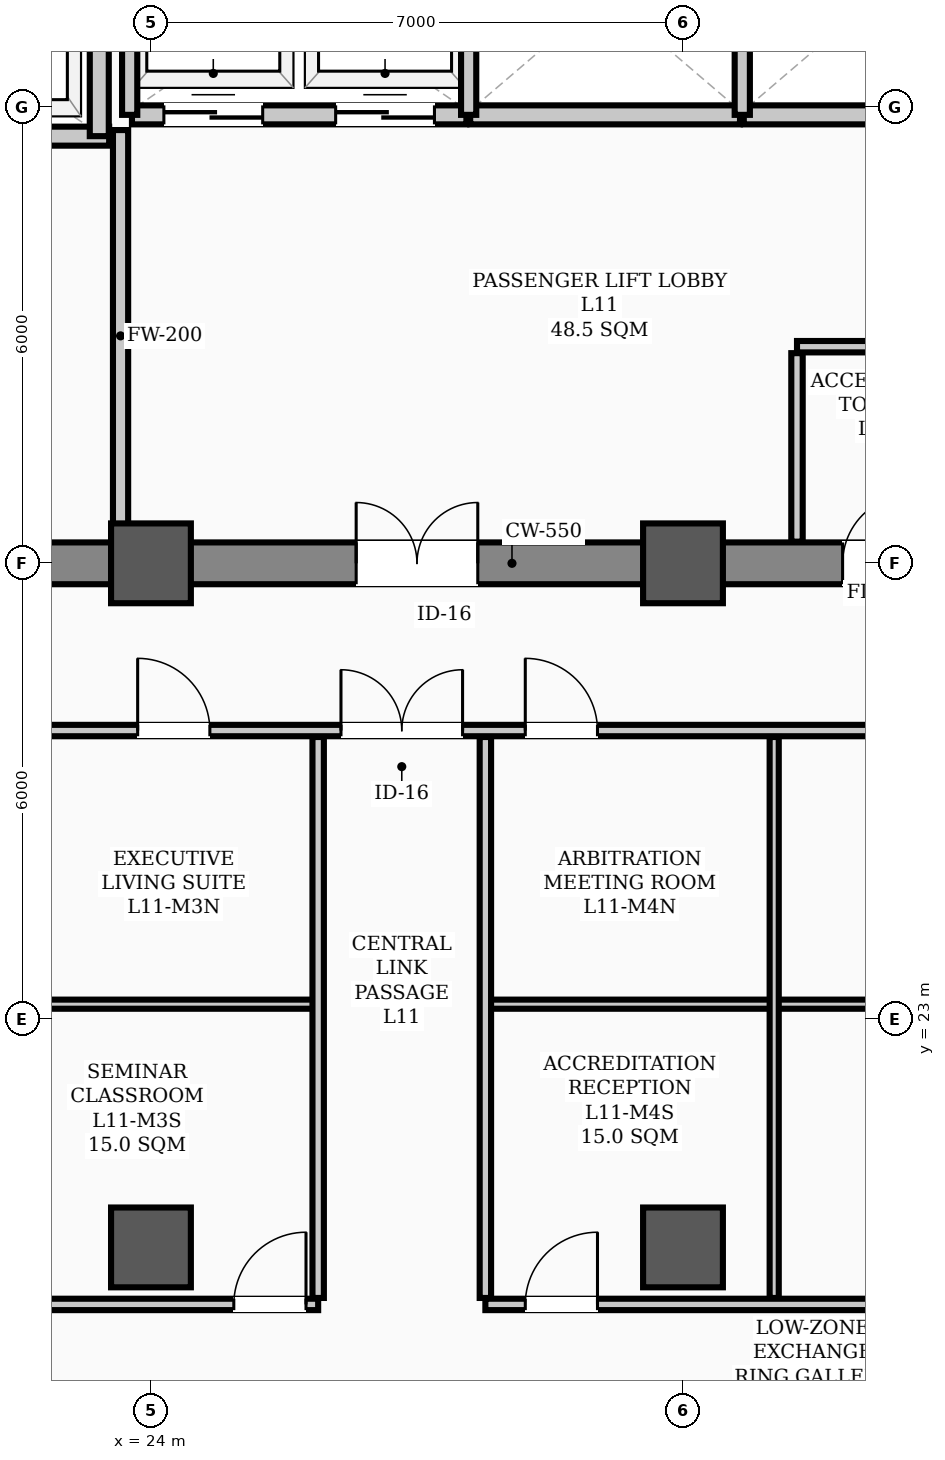
"""IFC4 building model, lengths in metres.
Left out: names, types, materials, properties, quantities, classifications, styles, units other than length and angle.
Written with IfcOpenShell. Run it as: python <this file> out.ifc"""

import sys

from ifc_helpers import new_model, si_unit, direction, frame, frame_2d, origin, origin_2d, place, context, subcontext, project, spatial, rectangle, hollow_rectangle, extrude, element, fill, save


model = new_model("IFC4")
c1 = context("Model", 3, precision=1e-05, world=origin(), true_north=direction((0.0, 1.0)))
c2 = subcontext(c1, "Body", "Model", "MODEL_VIEW")
j1 = project(units=[si_unit("LENGTHUNIT", "METRE"), si_unit("PLANEANGLEUNIT", "RADIAN")], contexts=[c1])
p1 = place(None, origin())
s1 = spatial("IfcSite", under=j1, at=p1, CompositionType="ELEMENT")
p2 = place(p1, origin())
s2 = spatial("IfcBuilding", under=s1, at=p2, CompositionType="ELEMENT")
p3 = place(p2, frame((0.0, 0.0, 46.0)))
s3 = spatial("IfcBuildingStorey", under=s2, at=p3, CompositionType="ELEMENT", Elevation=46.0)
for number, where, z_axis, x_axis in (
    (1, (24.0, 29.0, 0.0), (0.0, 0.0, 1.0), (1.0, 0.0, 0.0)),
    (2, (31.0, 29.0, 0.0), (0.0, 0.0, 1.0), (1.0, 0.0, 0.0)),
    (3, (24.0, 20.0, 0.0), (0.0, 0.0, 1.0), (1.0, 0.0, 0.0)),
    (4, (31.0, 20.0, 0.0), (0.0, 0.0, 1.0), (1.0, 0.0, 0.0)),
):
    element("IfcColumn", number, at=place(p3, frame(where, z_axis=z_axis, x_axis=x_axis)), inside=s3, PredefinedType="COLUMN", context=c2, shape_type="SweptSolid", body=[
        extrude(hollow_rectangle(XDim=1.05, YDim=1.05, WallThickness=0.038, InnerFilletRadius=0.019, OuterFilletRadius=0.057, at=origin_2d()), origin(), (0.0, 0.0, 1.0), 3.9),
    ])
p4 = place(p3, frame((13.5, 29.0, 0.0), z_axis=(0.0, 0.0, 1.0), x_axis=(1.0, 0.0, 0.0)))
e5 = element("IfcWall", 5, at=p4, inside=s3, PredefinedType="SHEAR", context=c2, shape_type="SweptSolid", body=[
    extrude(rectangle(XDim=30.5, YDim=0.55, at=frame_2d((15.25, 0.0))), origin(), (0.0, 0.0, 1.0), 3.72),
])
p5 = place(p4, frame((1.75, 0.0, 0.0)))
e6 = element("IfcOpeningElement", 6, at=p5, cuts=e5, PredefinedType="OPENING", context=c2, shape_type="SweptSolid", body=[
    extrude(rectangle(XDim=1.1, YDim=2.08, at=frame_2d((0.55, 1.04))), frame((0.0, 0.285, 0.0), z_axis=(0.0, -1.0, 0.0), x_axis=(1.0, 0.0, 0.0)), (0.0, 0.0, 1.0), 0.57),
])
p6 = place(p4, frame((26.7, 0.0, 0.0)))
e7 = element("IfcOpeningElement", 7, at=p6, cuts=e5, PredefinedType="OPENING", context=c2, shape_type="SweptSolid", body=[
    extrude(rectangle(XDim=1.1, YDim=2.08, at=frame_2d((0.55, 1.04))), frame((0.0, 0.285, 0.0), z_axis=(0.0, -1.0, 0.0), x_axis=(1.0, 0.0, 0.0)), (0.0, 0.0, 1.0), 0.57),
])
p7 = place(p4, frame((6.8, 0.0, 0.0)))
e8 = element("IfcOpeningElement", 8, at=p7, cuts=e5, PredefinedType="OPENING", context=c2, shape_type="SweptSolid", body=[
    extrude(rectangle(XDim=1.1, YDim=2.08, at=frame_2d((0.55, 1.04))), frame((0.0, 0.285, 0.0), z_axis=(0.0, -1.0, 0.0), x_axis=(1.0, 0.0, 0.0)), (0.0, 0.0, 1.0), 0.57),
])
p8 = place(p4, frame((13.2, 0.0, 0.0)))
e9 = element("IfcOpeningElement", 9, at=p8, cuts=e5, PredefinedType="OPENING", context=c2, shape_type="SweptSolid", body=[
    extrude(rectangle(XDim=1.6, YDim=2.08, at=frame_2d((0.8, 1.04))), frame((0.0, 0.285, 0.0), z_axis=(0.0, -1.0, 0.0), x_axis=(1.0, 0.0, 0.0)), (0.0, 0.0, 1.0), 0.57),
])
p9 = place(p4, frame((19.6, 0.0, 0.0)))
e10 = element("IfcOpeningElement", 10, at=p9, cuts=e5, PredefinedType="OPENING", context=c2, shape_type="SweptSolid", body=[
    extrude(rectangle(XDim=0.9, YDim=2.08, at=frame_2d((0.45, 1.04))), frame((0.0, 0.285, 0.0), z_axis=(0.0, -1.0, 0.0), x_axis=(1.0, 0.0, 0.0)), (0.0, 0.0, 1.0), 0.57),
])
p10 = place(p4, frame((21.6, 0.0, 0.0)))
e11 = element("IfcOpeningElement", 11, at=p10, cuts=e5, PredefinedType="OPENING", context=c2, shape_type="SweptSolid", body=[
    extrude(rectangle(XDim=0.9, YDim=2.08, at=frame_2d((0.45, 1.04))), frame((0.0, 0.285, 0.0), z_axis=(0.0, -1.0, 0.0), x_axis=(1.0, 0.0, 0.0)), (0.0, 0.0, 1.0), 0.57),
])
p11 = place(p3, frame((18.1, 34.62, 0.0), z_axis=(0.0, 0.0, 1.0), x_axis=(1.0, 0.0, 0.0)))
e12 = element("IfcWall", 12, at=p11, inside=s3, PredefinedType="STANDARD", context=c2, shape_type="SweptSolid", body=[
    extrude(rectangle(XDim=5.35, YDim=0.25, at=frame_2d((2.675, 0.0))), origin(), (0.0, 0.0, 1.0), 3.72),
])
p12 = place(p11, frame((0.85, 0.0, 0.0)))
e13 = element("IfcOpeningElement", 13, at=p12, cuts=e12, PredefinedType="OPENING", context=c2, shape_type="SweptSolid", body=[
    extrude(rectangle(XDim=1.1, YDim=2.08, at=frame_2d((0.55, 1.04))), frame((0.0, 0.135, 0.0), z_axis=(0.0, -1.0, 0.0), x_axis=(1.0, 0.0, 0.0)), (0.0, 0.0, 1.0), 0.27),
])
p13 = place(p11, frame((3.45, 0.0, 0.0)))
e14 = element("IfcOpeningElement", 14, at=p13, cuts=e12, PredefinedType="OPENING", context=c2, shape_type="SweptSolid", body=[
    extrude(rectangle(XDim=1.1, YDim=2.08, at=frame_2d((0.55, 1.04))), frame((0.0, 0.135, 0.0), z_axis=(0.0, -1.0, 0.0), x_axis=(1.0, 0.0, 0.0)), (0.0, 0.0, 1.0), 0.27),
])
p14 = place(p3, frame((23.32, 34.62, 0.0), z_axis=(0.0, 0.0, 1.0), x_axis=(0.0, 1.0, 0.0)))
e15 = element("IfcWall", 15, at=p14, inside=s3, PredefinedType="STANDARD", context=c2, shape_type="SweptSolid", body=[
    extrude(rectangle(XDim=3.33, YDim=0.25, at=frame_2d((1.665, 0.0))), origin(), (0.0, 0.0, 1.0), 3.3),
])
p15 = place(p3, frame((23.75, 34.9, 0.0), z_axis=(0.0, 0.0, 1.0), x_axis=(1.0, 0.0, 0.0)))
e16 = element("IfcWall", 16, at=p15, inside=s3, PredefinedType="STANDARD", context=c2, shape_type="SweptSolid", body=[
    extrude(rectangle(XDim=4.4, YDim=0.25, at=frame_2d((2.2, 0.0))), origin(), (0.0, 0.0, 1.0), 3.72),
])
p16 = place(p15, frame((0.42, 0.0, 0.0)))
e17 = element("IfcOpeningElement", 17, at=p16, cuts=e16, PredefinedType="OPENING", context=c2, shape_type="SweptSolid", body=[
    extrude(rectangle(XDim=1.3, YDim=2.08, at=frame_2d((0.65, 1.04))), frame((0.0, 0.135, 0.0), z_axis=(0.0, -1.0, 0.0), x_axis=(1.0, 0.0, 0.0)), (0.0, 0.0, 1.0), 0.27),
])
p17 = place(p15, frame((2.68, 0.0, 0.0)))
e18 = element("IfcOpeningElement", 18, at=p17, cuts=e16, PredefinedType="OPENING", context=c2, shape_type="SweptSolid", body=[
    extrude(rectangle(XDim=1.3, YDim=2.08, at=frame_2d((0.65, 1.04))), frame((0.0, 0.135, 0.0), z_axis=(0.0, -1.0, 0.0), x_axis=(1.0, 0.0, 0.0)), (0.0, 0.0, 1.0), 0.27),
])
p18 = place(p3, frame((28.2, 34.9, 0.0), z_axis=(0.0, 0.0, 1.0), x_axis=(1.0, 0.0, 0.0)))
e19 = element("IfcWall", 19, at=p18, inside=s3, PredefinedType="STANDARD", context=c2, shape_type="SweptSolid", body=[
    extrude(rectangle(XDim=3.55, YDim=0.25, at=frame_2d((1.775, 0.0))), origin(), (0.0, 0.0, 1.0), 3.72),
])
p19 = place(p3, frame((31.8, 34.9, 0.0), z_axis=(0.0, 0.0, 1.0), x_axis=(1.0, 0.0, 0.0)))
e20 = element("IfcWall", 20, at=p19, inside=s3, PredefinedType="STANDARD", context=c2, shape_type="SweptSolid", body=[
    extrude(rectangle(XDim=3.6, YDim=0.25, at=frame_2d((1.8, 0.0))), origin(), (0.0, 0.0, 1.0), 3.72),
])
p20 = place(p3, frame((32.5, 31.85, 0.0), z_axis=(0.0, 0.0, 1.0), x_axis=(1.0, 0.0, 0.0)))
e21 = element("IfcWall", 21, at=p20, inside=s3, PredefinedType="PARTITIONING", context=c2, shape_type="SweptSolid", body=[
    extrude(rectangle(XDim=4.1, YDim=0.15, at=frame_2d((2.05, 0.0))), origin(), (0.0, 0.0, 1.0), 3.72),
])
p21 = place(p3, frame((12.9, 26.8, 0.0), z_axis=(0.0, 0.0, 1.0), x_axis=(1.0, 0.0, 0.0)))
e22 = element("IfcWall", 22, at=p21, inside=s3, PredefinedType="PARTITIONING", context=c2, shape_type="SweptSolid", body=[
    extrude(rectangle(XDim=31.7, YDim=0.15, at=frame_2d((15.85, 0.0))), origin(), (0.0, 0.0, 1.0), 3.1),
])
p22 = place(p21, frame((13.6, 0.0, 0.0)))
e23 = element("IfcOpeningElement", 23, at=p22, cuts=e22, PredefinedType="OPENING", context=c2, shape_type="SweptSolid", body=[
    extrude(rectangle(XDim=1.6, YDim=2.08, at=frame_2d((0.8, 1.04))), frame((0.0, 0.085, 0.0), z_axis=(0.0, -1.0, 0.0), x_axis=(1.0, 0.0, 0.0)), (0.0, 0.0, 1.0), 0.17),
])
p23 = place(p21, frame((2.175, 0.0, 0.0)))
e24 = element("IfcOpeningElement", 24, at=p23, cuts=e22, PredefinedType="OPENING", context=c2, shape_type="SweptSolid", body=[
    extrude(rectangle(XDim=0.95, YDim=2.08, at=frame_2d((0.475, 1.04))), frame((0.0, 0.085, 0.0), z_axis=(0.0, -1.0, 0.0), x_axis=(1.0, 0.0, 0.0)), (0.0, 0.0, 1.0), 0.17),
])
p24 = place(p21, frame((6.925, 0.0, 0.0)))
e25 = element("IfcOpeningElement", 25, at=p24, cuts=e22, PredefinedType="OPENING", context=c2, shape_type="SweptSolid", body=[
    extrude(rectangle(XDim=0.95, YDim=2.08, at=frame_2d((0.475, 1.04))), frame((0.0, 0.085, 0.0), z_axis=(0.0, -1.0, 0.0), x_axis=(1.0, 0.0, 0.0)), (0.0, 0.0, 1.0), 0.17),
])
p25 = place(p21, frame((10.925, 0.0, 0.0)))
e26 = element("IfcOpeningElement", 26, at=p25, cuts=e22, PredefinedType="OPENING", context=c2, shape_type="SweptSolid", body=[
    extrude(rectangle(XDim=0.95, YDim=2.08, at=frame_2d((0.475, 1.04))), frame((0.0, 0.085, 0.0), z_axis=(0.0, -1.0, 0.0), x_axis=(1.0, 0.0, 0.0)), (0.0, 0.0, 1.0), 0.17),
])
p26 = place(p21, frame((16.025, 0.0, 0.0)))
e27 = element("IfcOpeningElement", 27, at=p26, cuts=e22, PredefinedType="OPENING", context=c2, shape_type="SweptSolid", body=[
    extrude(rectangle(XDim=0.95, YDim=2.08, at=frame_2d((0.475, 1.04))), frame((0.0, 0.085, 0.0), z_axis=(0.0, -1.0, 0.0), x_axis=(1.0, 0.0, 0.0)), (0.0, 0.0, 1.0), 0.17),
])
p27 = place(p21, frame((21.725, 0.0, 0.0)))
e28 = element("IfcOpeningElement", 28, at=p27, cuts=e22, PredefinedType="OPENING", context=c2, shape_type="SweptSolid", body=[
    extrude(rectangle(XDim=0.95, YDim=2.08, at=frame_2d((0.475, 1.04))), frame((0.0, 0.085, 0.0), z_axis=(0.0, -1.0, 0.0), x_axis=(1.0, 0.0, 0.0)), (0.0, 0.0, 1.0), 0.17),
])
p28 = place(p21, frame((27.925, 0.0, 0.0)))
e29 = element("IfcOpeningElement", 29, at=p28, cuts=e22, PredefinedType="OPENING", context=c2, shape_type="SweptSolid", body=[
    extrude(rectangle(XDim=0.95, YDim=2.08, at=frame_2d((0.475, 1.04))), frame((0.0, 0.085, 0.0), z_axis=(0.0, -1.0, 0.0), x_axis=(1.0, 0.0, 0.0)), (0.0, 0.0, 1.0), 0.17),
])
p29 = place(p3, frame((12.9, 19.25, 0.0), z_axis=(0.0, 0.0, 1.0), x_axis=(1.0, 0.0, 0.0)))
e30 = element("IfcWall", 30, at=p29, inside=s3, PredefinedType="PARTITIONING", context=c2, shape_type="SweptSolid", body=[
    extrude(rectangle(XDim=13.3, YDim=0.15, at=frame_2d((6.65, 0.0))), origin(), (0.0, 0.0, 1.0), 3.1),
])
p30 = place(p29, frame((2.175, 0.0, 0.0)))
e31 = element("IfcOpeningElement", 31, at=p30, cuts=e30, PredefinedType="OPENING", context=c2, shape_type="SweptSolid", body=[
    extrude(rectangle(XDim=0.95, YDim=2.08, at=frame_2d((0.475, 1.04))), frame((0.0, 0.085, 0.0), z_axis=(0.0, -1.0, 0.0), x_axis=(1.0, 0.0, 0.0)), (0.0, 0.0, 1.0), 0.17),
])
p31 = place(p29, frame((6.925, 0.0, 0.0)))
e32 = element("IfcOpeningElement", 32, at=p31, cuts=e30, PredefinedType="OPENING", context=c2, shape_type="SweptSolid", body=[
    extrude(rectangle(XDim=0.95, YDim=2.08, at=frame_2d((0.475, 1.04))), frame((0.0, 0.085, 0.0), z_axis=(0.0, -1.0, 0.0), x_axis=(1.0, 0.0, 0.0)), (0.0, 0.0, 1.0), 0.17),
])
p32 = place(p29, frame((12.19, 0.0, 0.0)))
e33 = element("IfcOpeningElement", 33, at=p32, cuts=e30, PredefinedType="OPENING", context=c2, shape_type="SweptSolid", body=[
    extrude(rectangle(XDim=0.95, YDim=2.08, at=frame_2d((0.475, 1.04))), frame((0.0, 0.085, 0.0), z_axis=(0.0, -1.0, 0.0), x_axis=(1.0, 0.0, 0.0)), (0.0, 0.0, 1.0), 0.17),
])
p33 = place(p3, frame((28.4, 19.25, 0.0), z_axis=(0.0, 0.0, 1.0), x_axis=(1.0, 0.0, 0.0)))
e34 = element("IfcWall", 34, at=p33, inside=s3, PredefinedType="PARTITIONING", context=c2, shape_type="SweptSolid", body=[
    extrude(rectangle(XDim=16.2, YDim=0.15, at=frame_2d((8.1, 0.0))), origin(), (0.0, 0.0, 1.0), 3.1),
])
p34 = place(p33, frame((0.525, 0.0, 0.0)))
e35 = element("IfcOpeningElement", 35, at=p34, cuts=e34, PredefinedType="OPENING", context=c2, shape_type="SweptSolid", body=[
    extrude(rectangle(XDim=0.95, YDim=2.08, at=frame_2d((0.475, 1.04))), frame((0.0, 0.085, 0.0), z_axis=(0.0, -1.0, 0.0), x_axis=(1.0, 0.0, 0.0)), (0.0, 0.0, 1.0), 0.17),
])
p35 = place(p33, frame((6.225, 0.0, 0.0)))
e36 = element("IfcOpeningElement", 36, at=p35, cuts=e34, PredefinedType="OPENING", context=c2, shape_type="SweptSolid", body=[
    extrude(rectangle(XDim=0.95, YDim=2.08, at=frame_2d((0.475, 1.04))), frame((0.0, 0.085, 0.0), z_axis=(0.0, -1.0, 0.0), x_axis=(1.0, 0.0, 0.0)), (0.0, 0.0, 1.0), 0.17),
])
p36 = place(p33, frame((12.425, 0.0, 0.0)))
e37 = element("IfcOpeningElement", 37, at=p36, cuts=e34, PredefinedType="OPENING", context=c2, shape_type="SweptSolid", body=[
    extrude(rectangle(XDim=0.95, YDim=2.08, at=frame_2d((0.475, 1.04))), frame((0.0, 0.085, 0.0), z_axis=(0.0, -1.0, 0.0), x_axis=(1.0, 0.0, 0.0)), (0.0, 0.0, 1.0), 0.17),
])
for number, where, z_axis, x_axis in (
    (38, (22.4, 23.2, 0.0), (0.0, 0.0, 1.0), (1.0, 0.0, 0.0)),
    (39, (28.4, 23.2, 0.0), (0.0, 0.0, 1.0), (1.0, 0.0, 0.0)),
):
    element("IfcWall", number, at=place(p3, frame(where, z_axis=z_axis, x_axis=x_axis)), inside=s3, PredefinedType="PARTITIONING", context=c2, shape_type="SweptSolid", body=[
        extrude(rectangle(XDim=3.8, YDim=0.12, at=frame_2d((1.9, 0.0))), origin(), (0.0, 0.0, 1.0), 3.1),
    ])
p37 = place(p3, frame((32.2, 23.2, 0.0), z_axis=(0.0, 0.0, 1.0), x_axis=(1.0, 0.0, 0.0)))
e40 = element("IfcWall", 40, at=p37, inside=s3, PredefinedType="PARTITIONING", context=c2, shape_type="SweptSolid", body=[
    extrude(rectangle(XDim=5.8, YDim=0.12, at=frame_2d((2.9, 0.0))), origin(), (0.0, 0.0, 1.0), 3.1),
])
p38 = place(p3, frame((23.6, 29.285, 0.0), z_axis=(0.0, 0.0, 1.0), x_axis=(0.0, 1.0, 0.0)))
e41 = element("IfcWall", 41, at=p38, inside=s3, PredefinedType="STANDARD", context=c2, shape_type="SweptSolid", body=[
    extrude(rectangle(XDim=5.415, YDim=0.2, at=frame_2d((2.708, 0.0))), origin(), (0.0, 0.0, 1.0), 3.1),
])
p39 = place(p3, frame((32.5, 29.285, 0.0), z_axis=(0.0, 0.0, 1.0), x_axis=(0.0, 1.0, 0.0)))
e42 = element("IfcWall", 42, at=p39, inside=s3, PredefinedType="PARTITIONING", context=c2, shape_type="SweptSolid", body=[
    extrude(rectangle(XDim=2.48, YDim=0.15, at=frame_2d((1.24, 0.0))), origin(), (0.0, 0.0, 1.0), 3.3),
])
for number, where, z_axis, x_axis in (
    (43, (26.2, 19.335, 0.0), (0.0, 0.0, 1.0), (0.0, 1.0, 0.0)),
    (44, (28.4, 19.335, 0.0), (0.0, 0.0, 1.0), (0.0, 1.0, 0.0)),
):
    element("IfcWall", number, at=place(p3, frame(where, z_axis=z_axis, x_axis=x_axis)), inside=s3, PredefinedType="PARTITIONING", context=c2, shape_type="SweptSolid", body=[
        extrude(rectangle(XDim=7.38, YDim=0.15, at=frame_2d((3.69, 0.0))), origin(), (0.0, 0.0, 1.0), 3.0),
    ])
p40 = place(p3, frame((32.2, 19.335, 0.0), z_axis=(0.0, 0.0, 1.0), x_axis=(0.0, 1.0, 0.0)))
e45 = element("IfcWall", 45, at=p40, inside=s3, PredefinedType="PARTITIONING", context=c2, shape_type="SweptSolid", body=[
    extrude(rectangle(XDim=7.38, YDim=0.12, at=frame_2d((3.69, 0.0))), origin(), (0.0, 0.0, 1.0), 3.0),
])
p41 = place(p3, frame((23.72, 34.9, 0.0), z_axis=(0.0, 0.0, 1.0), x_axis=(0.0, 1.0, 0.0)))
e46 = element("IfcWall", 46, at=p41, inside=s3, PredefinedType="STANDARD", context=c2, shape_type="SweptSolid", body=[
    extrude(rectangle(XDim=3.12, YDim=0.2, at=frame_2d((1.56, 0.0))), origin(), (0.0, 0.0, 1.0), 3.1),
])
for number, where, z_axis, x_axis in (
    (47, (28.18, 34.9, 0.0), (0.0, 0.0, 1.0), (0.0, 1.0, 0.0)),
    (48, (31.78, 34.9, 0.0), (0.0, 0.0, 1.0), (0.0, 1.0, 0.0)),
):
    element("IfcWall", number, at=place(p3, frame(where, z_axis=z_axis, x_axis=x_axis)), inside=s3, PredefinedType="STANDARD", context=c2, shape_type="SweptSolid", body=[
        extrude(rectangle(XDim=3.12, YDim=0.2, at=frame_2d((1.56, 0.0))), origin(), (0.0, 0.0, 1.0), 3.3),
    ])
p42 = place(p8, origin())
e49 = element("IfcDoor", 49, at=p42, inside=s3, OperationType="DOUBLE_DOOR_SINGLE_SWING", PredefinedType="DOOR", context=c2, shape_type="SweptSolid", body=[
    extrude(rectangle(XDim=1.6, YDim=2.08, at=frame_2d((0.8, 1.04))), frame((0.0, 0.025, 0.0), z_axis=(0.0, -1.0, 0.0), x_axis=(1.0, 0.0, 0.0)), (0.0, 0.0, 1.0), 0.05),
])
fill(e9, e49)
p43 = place(p9, origin())
e50 = element("IfcDoor", 50, at=p43, inside=s3, OperationType="SINGLE_SWING_RIGHT", PredefinedType="DOOR", context=c2, shape_type="SweptSolid", body=[
    extrude(rectangle(XDim=0.9, YDim=2.08, at=frame_2d((0.45, 1.04))), frame((0.0, 0.025, 0.0), z_axis=(0.0, -1.0, 0.0), x_axis=(1.0, 0.0, 0.0)), (0.0, 0.0, 1.0), 0.05),
])
fill(e10, e50)
p44 = place(p22, origin())
e51 = element("IfcDoor", 51, at=p44, inside=s3, OperationType="DOUBLE_DOOR_SINGLE_SWING", PredefinedType="DOOR", context=c2, shape_type="SweptSolid", body=[
    extrude(rectangle(XDim=1.6, YDim=2.08, at=frame_2d((0.8, 1.04))), frame((0.0, 0.025, 0.0), z_axis=(0.0, -1.0, 0.0), x_axis=(1.0, 0.0, 0.0)), (0.0, 0.0, 1.0), 0.05),
])
fill(e23, e51)
p45 = place(p25, origin())
e52 = element("IfcDoor", 52, at=p45, inside=s3, OperationType="SINGLE_SWING_LEFT", PredefinedType="DOOR", context=c2, shape_type="SweptSolid", body=[
    extrude(rectangle(XDim=0.95, YDim=2.08, at=frame_2d((0.475, 1.04))), frame((0.0, 0.025, 0.0), z_axis=(0.0, -1.0, 0.0), x_axis=(1.0, 0.0, 0.0)), (0.0, 0.0, 1.0), 0.05),
])
fill(e26, e52)
p46 = place(p32, origin())
e53 = element("IfcDoor", 53, at=p46, inside=s3, OperationType="SINGLE_SWING_RIGHT", PredefinedType="DOOR", context=c2, shape_type="SweptSolid", body=[
    extrude(rectangle(XDim=0.95, YDim=2.08, at=frame_2d((0.475, 1.04))), frame((0.0, 0.025, 0.0), z_axis=(0.0, -1.0, 0.0), x_axis=(1.0, 0.0, 0.0)), (0.0, 0.0, 1.0), 0.05),
])
fill(e33, e53)
p47 = place(p26, origin())
e54 = element("IfcDoor", 54, at=p47, inside=s3, OperationType="SINGLE_SWING_LEFT", PredefinedType="DOOR", context=c2, shape_type="SweptSolid", body=[
    extrude(rectangle(XDim=0.95, YDim=2.08, at=frame_2d((0.475, 1.04))), frame((0.0, 0.025, 0.0), z_axis=(0.0, -1.0, 0.0), x_axis=(1.0, 0.0, 0.0)), (0.0, 0.0, 1.0), 0.05),
])
fill(e27, e54)
p48 = place(p34, origin())
e55 = element("IfcDoor", 55, at=p48, inside=s3, OperationType="SINGLE_SWING_RIGHT", PredefinedType="DOOR", context=c2, shape_type="SweptSolid", body=[
    extrude(rectangle(XDim=0.95, YDim=2.08, at=frame_2d((0.475, 1.04))), frame((0.0, 0.025, 0.0), z_axis=(0.0, -1.0, 0.0), x_axis=(1.0, 0.0, 0.0)), (0.0, 0.0, 1.0), 0.05),
])
fill(e35, e55)
p49 = place(p16, origin())
e56 = element("IfcDoor", 56, at=p49, inside=s3, OperationType="DOUBLE_DOOR_SLIDING", PredefinedType="DOOR", context=c2, shape_type="SweptSolid", body=[
    extrude(rectangle(XDim=1.3, YDim=2.08, at=frame_2d((0.65, 1.04))), frame((0.0, 0.025, 0.0), z_axis=(0.0, -1.0, 0.0), x_axis=(1.0, 0.0, 0.0)), (0.0, 0.0, 1.0), 0.05),
])
fill(e17, e56)
p50 = place(p17, origin())
e57 = element("IfcDoor", 57, at=p50, inside=s3, OperationType="DOUBLE_DOOR_SLIDING", PredefinedType="DOOR", context=c2, shape_type="SweptSolid", body=[
    extrude(rectangle(XDim=1.3, YDim=2.08, at=frame_2d((0.65, 1.04))), frame((0.0, 0.025, 0.0), z_axis=(0.0, -1.0, 0.0), x_axis=(1.0, 0.0, 0.0)), (0.0, 0.0, 1.0), 0.05),
])
fill(e18, e57)
save(model, sys.argv[1])
